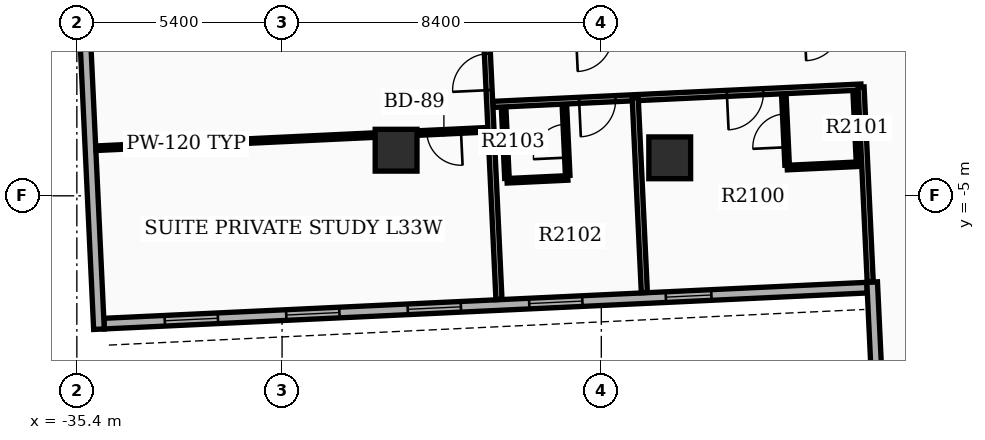
"""IFC4 building model, lengths in metres.
Left out: names, types, materials, properties, quantities, classifications, styles, units other than length and angle.
Written with IfcOpenShell. Run it as: python <this file> out.ifc"""

import sys

from ifc_helpers import new_model, si_unit, direction, frame, frame_2d, origin, origin_2d, place, context, subcontext, project, spatial, rectangle, extrude, element, fill, save


model = new_model("IFC4")
c1 = context("Model", 3, precision=1e-05, world=origin(), true_north=direction((0.0, 1.0)))
c2 = subcontext(c1, "Body", "Model", "MODEL_VIEW")
j1 = project(units=[si_unit("LENGTHUNIT", "METRE"), si_unit("PLANEANGLEUNIT", "RADIAN")], contexts=[c1])
p1 = place(None, origin())
s1 = spatial("IfcSite", under=j1, at=p1, CompositionType="ELEMENT")
p2 = place(p1, origin())
s2 = spatial("IfcBuilding", under=s1, at=p2, CompositionType="ELEMENT")
p3 = place(p2, frame((0.0, 0.0, 132.0)))
s3 = spatial("IfcBuildingStorey", under=s2, at=p3, CompositionType="ELEMENT", Elevation=132.0)
for number, where, z_axis, x_axis in (
    (1, (-19.8, -4.0, 0.0), (0.0, 0.0, 1.0), (1.0, 0.0, 0.0)),
    (2, (-27.0, -3.8, 0.0), (0.0, 0.0, 1.0), (1.0, 0.0, 0.0)),
):
    element("IfcColumn", number, at=place(p3, frame(where, z_axis=z_axis, x_axis=x_axis)), inside=s3, PredefinedType="COLUMN", context=c2, shape_type="SweptSolid", body=[
        extrude(rectangle(XDim=1.1, YDim=1.1, at=origin_2d()), origin(), (0.0, 0.0, 1.0), 3.9),
    ])
p4 = place(p3, frame((-34.685, -8.363, 0.0), z_axis=(0.0, 0.0, 1.0), x_axis=(0.998890015344, 0.047103473814, 0.0)))
e3 = element("IfcWall", 3, at=p4, inside=s3, PredefinedType="STANDARD", context=c2, shape_type="SweptSolid", body=[
    extrude(rectangle(XDim=20.1, YDim=0.28, at=frame_2d((10.05, 0.0))), origin(), (0.0, 0.0, 1.0), 2.97),
])
p5 = place(p4, frame((1.6, 0.0, 0.8)))
e4 = element("IfcOpeningElement", 4, at=p5, cuts=e3, PredefinedType="OPENING", context=c2, shape_type="SweptSolid", body=[
    extrude(rectangle(XDim=1.4, YDim=1.6, at=frame_2d((0.7, 0.8))), frame((0.0, 0.15, 0.0), z_axis=(0.0, -1.0, 0.0), x_axis=(1.0, 0.0, 0.0)), (0.0, 0.0, 1.0), 0.3),
])
p6 = place(p4, frame((4.8, 0.0, 0.8)))
e5 = element("IfcOpeningElement", 5, at=p6, cuts=e3, PredefinedType="OPENING", context=c2, shape_type="SweptSolid", body=[
    extrude(rectangle(XDim=1.4, YDim=1.6, at=frame_2d((0.7, 0.8))), frame((0.0, 0.15, 0.0), z_axis=(0.0, -1.0, 0.0), x_axis=(1.0, 0.0, 0.0)), (0.0, 0.0, 1.0), 0.3),
])
p7 = place(p4, frame((8.0, 0.0, 0.8)))
e6 = element("IfcOpeningElement", 6, at=p7, cuts=e3, PredefinedType="OPENING", context=c2, shape_type="SweptSolid", body=[
    extrude(rectangle(XDim=1.4, YDim=1.6, at=frame_2d((0.7, 0.8))), frame((0.0, 0.15, 0.0), z_axis=(0.0, -1.0, 0.0), x_axis=(1.0, 0.0, 0.0)), (0.0, 0.0, 1.0), 0.3),
])
p8 = place(p4, frame((11.2, 0.0, 0.8)))
e7 = element("IfcOpeningElement", 7, at=p8, cuts=e3, PredefinedType="OPENING", context=c2, shape_type="SweptSolid", body=[
    extrude(rectangle(XDim=1.4, YDim=1.6, at=frame_2d((0.7, 0.8))), frame((0.0, 0.15, 0.0), z_axis=(0.0, -1.0, 0.0), x_axis=(1.0, 0.0, 0.0)), (0.0, 0.0, 1.0), 0.3),
])
p9 = place(p4, frame((14.799, 0.0, 0.85)))
e8 = element("IfcOpeningElement", 8, at=p9, cuts=e3, PredefinedType="OPENING", context=c2, shape_type="SweptSolid", body=[
    extrude(rectangle(XDim=1.2, YDim=1.6, at=frame_2d((0.6, 0.8))), frame((0.0, 0.15, 0.0), z_axis=(0.0, -1.0, 0.0), x_axis=(1.0, 0.0, 0.0)), (0.0, 0.0, 1.0), 0.3),
])
p10 = place(p3, frame((-35.464, 5.195, 0.0), z_axis=(0.0, 0.0, 1.0), x_axis=(0.047101845086, -0.998890092147, 0.0)))
e9 = element("IfcWall", 9, at=p10, inside=s3, PredefinedType="STANDARD", context=c2, shape_type="SweptSolid", body=[
    extrude(rectangle(XDim=13.72, YDim=0.28, at=frame_2d((6.86, 0.0))), origin(), (0.0, 0.0, 1.0), 2.97),
])
p11 = place(p10, frame((0.85, 0.0, 0.85)))
e10 = element("IfcOpeningElement", 10, at=p11, cuts=e9, PredefinedType="OPENING", context=c2, shape_type="SweptSolid", body=[
    extrude(rectangle(XDim=1.0, YDim=1.5, at=frame_2d((0.5, 0.75))), frame((0.0, 0.15, 0.0), z_axis=(0.0, -1.0, 0.0), x_axis=(1.0, 0.0, 0.0)), (0.0, 0.0, 1.0), 0.3),
])
p12 = place(p3, frame((-14.474, -7.27, 0.0), z_axis=(0.0, 0.0, 1.0), x_axis=(0.04712043756, -0.998889215261, 0.0)))
e11 = element("IfcWall", 11, at=p12, inside=s3, PredefinedType="STANDARD", context=c2, shape_type="SweptSolid", body=[
    extrude(rectangle(XDim=6.86, YDim=0.28, at=frame_2d((3.43, 0.0))), origin(), (0.0, 0.0, 1.0), 2.97),
])
p13 = place(p3, frame((-14.766, -2.138, 0.0), z_axis=(0.0, 0.0, 1.0), x_axis=(-0.99888939101, -0.047116711769, 0.0)))
e12 = element("IfcWall", 12, at=p13, inside=s3, PredefinedType="PARTITIONING", context=c2, shape_type="SweptSolid", body=[
    extrude(rectangle(XDim=9.7, YDim=0.16, at=frame_2d((4.85, 0.0))), origin(), (0.0, 0.0, 1.0), 2.96),
])
p14 = place(p13, frame((2.575, 0.0, 0.0)))
e13 = element("IfcOpeningElement", 13, at=p14, cuts=e12, PredefinedType="OPENING", context=c2, shape_type="SweptSolid", body=[
    extrude(rectangle(XDim=0.96, YDim=2.15, at=frame_2d((0.48, 1.075))), frame((0.0, 0.09, 0.0), z_axis=(0.0, -1.0, 0.0), x_axis=(1.0, 0.0, 0.0)), (0.0, 0.0, 1.0), 0.18),
])
p15 = place(p13, frame((6.467, 0.0, 0.0)))
e14 = element("IfcOpeningElement", 14, at=p15, cuts=e12, PredefinedType="OPENING", context=c2, shape_type="SweptSolid", body=[
    extrude(rectangle(XDim=0.96, YDim=2.15, at=frame_2d((0.48, 1.075))), frame((0.0, 0.09, 0.0), z_axis=(0.0, -1.0, 0.0), x_axis=(1.0, 0.0, 0.0)), (0.0, 0.0, 1.0), 0.18),
])
p16 = place(p3, frame((-14.766, -2.138, 0.0), z_axis=(0.0, 0.0, 1.0), x_axis=(0.047095033298, -0.998890413328, 0.0)))
e15 = element("IfcWall", 15, at=p16, inside=s3, PredefinedType="PARTITIONING", context=c2, shape_type="SweptSolid", body=[
    extrude(rectangle(XDim=5.132, YDim=0.16, at=frame_2d((2.566, 0.0))), origin(), (0.0, 0.0, 1.0), 2.96),
])
p17 = place(p3, frame((-20.709, -2.418, 0.0), z_axis=(0.0, 0.0, 1.0), x_axis=(0.047097271264, -0.998890307811, 0.0)))
e16 = element("IfcWall", 16, at=p17, inside=s3, PredefinedType="PARTITIONING", context=c2, shape_type="SweptSolid", body=[
    extrude(rectangle(XDim=5.132, YDim=0.16, at=frame_2d((2.566, 0.0))), origin(), (0.0, 0.0, 1.0), 2.96),
])
p18 = place(p3, frame((-16.711, -4.192, 0.0), z_axis=(0.0, 0.0, 1.0), x_axis=(-0.047080807099, 0.998891083954, 0.0)))
e17 = element("IfcWall", 17, at=p18, inside=s3, PredefinedType="PARTITIONING", context=c2, shape_type="SweptSolid", body=[
    extrude(rectangle(XDim=1.82, YDim=0.12, at=frame_2d((0.91, 0.0))), origin(), (0.0, 0.0, 1.0), 2.96),
])
p19 = place(p18, frame((0.47, 0.0, 0.0)))
e18 = element("IfcOpeningElement", 18, at=p19, cuts=e17, PredefinedType="OPENING", context=c2, shape_type="SweptSolid", body=[
    extrude(rectangle(XDim=0.88, YDim=2.1, at=frame_2d((0.44, 1.05))), frame((0.0, 0.07, 0.0), z_axis=(0.0, -1.0, 0.0), x_axis=(1.0, 0.0, 0.0)), (0.0, 0.0, 1.0), 0.14),
])
p20 = place(p3, frame((-14.833, -4.103, 0.0), z_axis=(0.0, 0.0, 1.0), x_axis=(-0.047087116047, 0.998890786574, 0.0)))
e19 = element("IfcWall", 19, at=p20, inside=s3, PredefinedType="PARTITIONING", context=c2, shape_type="SweptSolid", body=[
    extrude(rectangle(XDim=1.82, YDim=0.12, at=frame_2d((0.91, 0.0))), origin(), (0.0, 0.0, 1.0), 2.96),
])
p21 = place(p3, frame((-14.83, -4.168, 0.0), z_axis=(0.0, 0.0, 1.0), x_axis=(-0.998888319371, -0.047139425368, 0.0)))
e20 = element("IfcWall", 20, at=p21, inside=s3, PredefinedType="PARTITIONING", context=c2, shape_type="SweptSolid", body=[
    extrude(rectangle(XDim=1.88, YDim=0.12, at=frame_2d((0.94, 0.0))), origin(), (0.0, 0.0, 1.0), 2.96),
])
p22 = place(p3, frame((-22.485, -4.464, 0.0), z_axis=(0.0, 0.0, 1.0), x_axis=(-0.047080807099, 0.998891083954, 0.0)))
e21 = element("IfcWall", 21, at=p22, inside=s3, PredefinedType="PARTITIONING", context=c2, shape_type="SweptSolid", body=[
    extrude(rectangle(XDim=1.82, YDim=0.12, at=frame_2d((0.91, 0.0))), origin(), (0.0, 0.0, 1.0), 2.96),
])
p23 = place(p22, frame((0.47, 0.0, 0.0)))
e22 = element("IfcOpeningElement", 22, at=p23, cuts=e21, PredefinedType="OPENING", context=c2, shape_type="SweptSolid", body=[
    extrude(rectangle(XDim=0.88, YDim=2.1, at=frame_2d((0.44, 1.05))), frame((0.0, 0.07, 0.0), z_axis=(0.0, -1.0, 0.0), x_axis=(1.0, 0.0, 0.0)), (0.0, 0.0, 1.0), 0.14),
])
p24 = place(p3, frame((-24.083, -4.54, 0.0), z_axis=(0.0, 0.0, 1.0), x_axis=(-0.047080807099, 0.998891083954, 0.0)))
e23 = element("IfcWall", 23, at=p24, inside=s3, PredefinedType="PARTITIONING", context=c2, shape_type="SweptSolid", body=[
    extrude(rectangle(XDim=1.82, YDim=0.12, at=frame_2d((0.91, 0.0))), origin(), (0.0, 0.0, 1.0), 2.96),
])
p25 = place(p3, frame((-22.482, -4.529, 0.0), z_axis=(0.0, 0.0, 1.0), x_axis=(-0.998887730798, -0.047151895633, 0.0)))
e24 = element("IfcWall", 24, at=p25, inside=s3, PredefinedType="PARTITIONING", context=c2, shape_type="SweptSolid", body=[
    extrude(rectangle(XDim=1.6, YDim=0.12, at=frame_2d((0.8, 0.0))), origin(), (0.0, 0.0, 1.0), 2.96),
])
p26 = place(p3, frame((-24.293, -7.725, 0.0), z_axis=(0.0, 0.0, 1.0), x_axis=(-0.047104484326, 0.998889967692, 0.0)))
e25 = element("IfcWall", 25, at=p26, inside=s3, PredefinedType="PARTITIONING", context=c2, shape_type="SweptSolid", body=[
    extrude(rectangle(XDim=13.144, YDim=0.16, at=frame_2d((6.572, 0.0))), origin(), (0.0, 0.0, 1.0), 2.96),
])
p27 = place(p26, frame((5.512, 0.0, 0.0)))
e26 = element("IfcOpeningElement", 26, at=p27, cuts=e25, PredefinedType="OPENING", context=c2, shape_type="SweptSolid", body=[
    extrude(rectangle(XDim=0.96, YDim=2.15, at=frame_2d((0.48, 1.075))), frame((0.0, 0.09, 0.0), z_axis=(0.0, -1.0, 0.0), x_axis=(1.0, 0.0, 0.0)), (0.0, 0.0, 1.0), 0.18),
])
p28 = place(p3, frame((-24.594, -3.262, 0.0), z_axis=(0.0, 0.0, 1.0), x_axis=(-0.998890681588, -0.047089343138, 0.0)))
e27 = element("IfcWall", 27, at=p28, inside=s3, PredefinedType="PARTITIONING", context=c2, shape_type="SweptSolid", body=[
    extrude(rectangle(XDim=10.312, YDim=0.12, at=frame_2d((5.156, 0.0))), origin(), (0.0, 0.0, 1.0), 2.96),
])
p29 = place(p28, frame((0.7, 0.0, 0.0)))
e28 = element("IfcOpeningElement", 28, at=p29, cuts=e27, PredefinedType="OPENING", context=c2, shape_type="SweptSolid", body=[
    extrude(rectangle(XDim=0.9, YDim=2.1, at=frame_2d((0.45, 1.05))), frame((0.0, 0.07, 0.0), z_axis=(0.0, -1.0, 0.0), x_axis=(1.0, 0.0, 0.0)), (0.0, 0.0, 1.0), 0.14),
])
p30 = place(p5, origin())
e29 = element("IfcWindow", 29, at=p30, inside=s3, PartitioningType="SINGLE_PANEL", PredefinedType="WINDOW", context=c2, shape_type="SweptSolid", body=[
    extrude(rectangle(XDim=1.4, YDim=1.6, at=frame_2d((0.7, 0.8))), frame((0.0, 0.03, 0.0), z_axis=(0.0, -1.0, 0.0), x_axis=(1.0, 0.0, 0.0)), (0.0, 0.0, 1.0), 0.06),
])
fill(e4, e29)
p31 = place(p6, origin())
e30 = element("IfcWindow", 30, at=p31, inside=s3, PartitioningType="SINGLE_PANEL", PredefinedType="WINDOW", context=c2, shape_type="SweptSolid", body=[
    extrude(rectangle(XDim=1.4, YDim=1.6, at=frame_2d((0.7, 0.8))), frame((0.0, 0.03, 0.0), z_axis=(0.0, -1.0, 0.0), x_axis=(1.0, 0.0, 0.0)), (0.0, 0.0, 1.0), 0.06),
])
fill(e5, e30)
p32 = place(p7, origin())
e31 = element("IfcWindow", 31, at=p32, inside=s3, PartitioningType="SINGLE_PANEL", PredefinedType="WINDOW", context=c2, shape_type="SweptSolid", body=[
    extrude(rectangle(XDim=1.4, YDim=1.6, at=frame_2d((0.7, 0.8))), frame((0.0, 0.03, 0.0), z_axis=(0.0, -1.0, 0.0), x_axis=(1.0, 0.0, 0.0)), (0.0, 0.0, 1.0), 0.06),
])
fill(e6, e31)
p33 = place(p8, origin())
e32 = element("IfcWindow", 32, at=p33, inside=s3, PartitioningType="SINGLE_PANEL", PredefinedType="WINDOW", context=c2, shape_type="SweptSolid", body=[
    extrude(rectangle(XDim=1.4, YDim=1.6, at=frame_2d((0.7, 0.8))), frame((0.0, 0.03, 0.0), z_axis=(0.0, -1.0, 0.0), x_axis=(1.0, 0.0, 0.0)), (0.0, 0.0, 1.0), 0.06),
])
fill(e7, e32)
p34 = place(p9, origin())
e33 = element("IfcWindow", 33, at=p34, inside=s3, PartitioningType="SINGLE_PANEL", PredefinedType="WINDOW", context=c2, shape_type="SweptSolid", body=[
    extrude(rectangle(XDim=1.2, YDim=1.6, at=frame_2d((0.6, 0.8))), frame((0.0, 0.03, 0.0), z_axis=(0.0, -1.0, 0.0), x_axis=(1.0, 0.0, 0.0)), (0.0, 0.0, 1.0), 0.06),
])
fill(e8, e33)
p35 = place(p14, origin())
e34 = element("IfcDoor", 34, at=p35, inside=s3, OperationType="SINGLE_SWING_RIGHT", PredefinedType="DOOR", context=c2, shape_type="SweptSolid", body=[
    extrude(rectangle(XDim=0.96, YDim=2.15, at=frame_2d((0.48, 1.075))), frame((0.0, 0.025, 0.0), z_axis=(0.0, -1.0, 0.0), x_axis=(1.0, 0.0, 0.0)), (0.0, 0.0, 1.0), 0.05),
])
fill(e13, e34)
p36 = place(p19, origin())
e35 = element("IfcDoor", 35, at=p36, inside=s3, OperationType="SINGLE_SWING_LEFT", PredefinedType="DOOR", context=c2, shape_type="SweptSolid", body=[
    extrude(rectangle(XDim=0.88, YDim=2.1, at=frame_2d((0.44, 1.05))), frame((0.0, 0.025, 0.0), z_axis=(0.0, -1.0, 0.0), x_axis=(1.0, 0.0, 0.0)), (0.0, 0.0, 1.0), 0.05),
])
fill(e18, e35)
p37 = place(p15, origin())
e36 = element("IfcDoor", 36, at=p37, inside=s3, OperationType="SINGLE_SWING_RIGHT", PredefinedType="DOOR", context=c2, shape_type="SweptSolid", body=[
    extrude(rectangle(XDim=0.96, YDim=2.15, at=frame_2d((0.48, 1.075))), frame((0.0, 0.025, 0.0), z_axis=(0.0, -1.0, 0.0), x_axis=(1.0, 0.0, 0.0)), (0.0, 0.0, 1.0), 0.05),
])
fill(e14, e36)
p38 = place(p23, origin())
e37 = element("IfcDoor", 37, at=p38, inside=s3, OperationType="SINGLE_SWING_LEFT", PredefinedType="DOOR", context=c2, shape_type="SweptSolid", body=[
    extrude(rectangle(XDim=0.88, YDim=2.1, at=frame_2d((0.44, 1.05))), frame((0.0, 0.025, 0.0), z_axis=(0.0, -1.0, 0.0), x_axis=(1.0, 0.0, 0.0)), (0.0, 0.0, 1.0), 0.05),
])
fill(e22, e37)
p39 = place(p27, origin())
e38 = element("IfcDoor", 38, at=p39, inside=s3, OperationType="SINGLE_SWING_LEFT", PredefinedType="DOOR", context=c2, shape_type="SweptSolid", body=[
    extrude(rectangle(XDim=0.96, YDim=2.15, at=frame_2d((0.48, 1.075))), frame((0.0, 0.025, 0.0), z_axis=(0.0, -1.0, 0.0), x_axis=(1.0, 0.0, 0.0)), (0.0, 0.0, 1.0), 0.05),
])
fill(e26, e38)
p40 = place(p29, origin())
e39 = element("IfcDoor", 39, at=p40, inside=s3, OperationType="SINGLE_SWING_LEFT", PredefinedType="DOOR", context=c2, shape_type="SweptSolid", body=[
    extrude(rectangle(XDim=0.9, YDim=2.1, at=frame_2d((0.45, 1.05))), frame((0.0, 0.025, 0.0), z_axis=(0.0, -1.0, 0.0), x_axis=(1.0, 0.0, 0.0)), (0.0, 0.0, 1.0), 0.05),
])
fill(e28, e39)
save(model, sys.argv[1])
